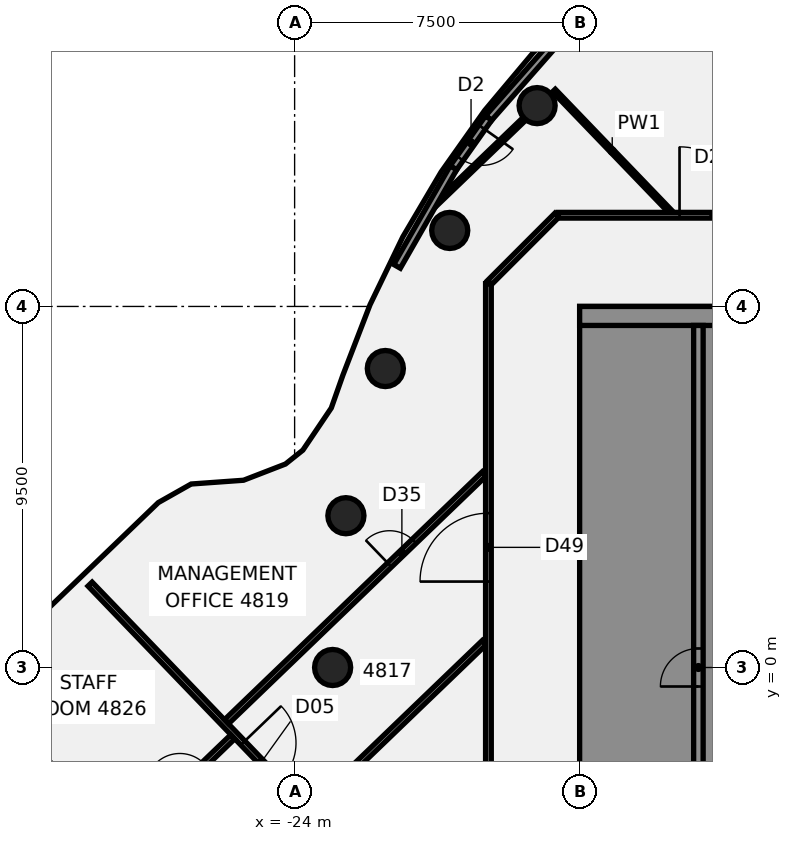
"""IFC4 building model, lengths in metres.
Left out: names, types, materials, properties, quantities, classifications, styles, units other than length and angle.
Written with IfcOpenShell. Run it as: python <this file> out.ifc"""

import sys

from ifc_helpers import new_model, si_unit, direction, frame, frame_2d, origin, origin_2d, place, context, subcontext, project, spatial, polyline, rectangle, circle, outline, extrude, element, fill, save


model = new_model("IFC4")
c1 = context("Model", 3, precision=1e-05, world=origin(), true_north=direction((0.0, 1.0)))
c2 = subcontext(c1, "Body", "Model", "MODEL_VIEW")
j1 = project(units=[si_unit("LENGTHUNIT", "METRE"), si_unit("PLANEANGLEUNIT", "RADIAN")], contexts=[c1])
p1 = place(None, origin())
s1 = spatial("IfcSite", under=j1, at=p1, CompositionType="ELEMENT")
p2 = place(p1, origin())
s2 = spatial("IfcBuilding", under=s1, at=p2, CompositionType="ELEMENT")
p3 = place(p2, frame((0.0, 0.0, 193.3)))
s3 = spatial("IfcBuildingStorey", under=s2, at=p3, CompositionType="ELEMENT", Elevation=193.3)
for number, where, z_axis, x_axis in (
    (1, (-17.619, 14.784, -0.14), (0.0, 0.0, 1.0), (1.0, 0.0, 0.0)),
    (2, (-19.919, 11.5, -0.14), (0.0, 0.0, 1.0), (1.0, 0.0, 0.0)),
    (3, (-21.613, 7.866, -0.14), (0.0, 0.0, 1.0), (1.0, 0.0, 0.0)),
    (4, (-22.651, 3.994, -0.14), (0.0, 0.0, 1.0), (1.0, 0.0, 0.0)),
    (5, (-23.0, 0.0, -0.14), (0.0, 0.0, 1.0), (1.0, 0.0, 0.0)),
):
    element("IfcColumn", number, at=place(p3, frame(where, z_axis=z_axis, x_axis=x_axis)), inside=s3, PredefinedType="COLUMN", context=c2, shape_type="SweptSolid", body=[
        extrude(circle(Radius=0.475, at=origin_2d()), origin(), (0.0, 0.0, 1.0), 3.6),
    ])
p4 = place(p3, frame((-29.383, 2.194, 0.0), z_axis=(0.0, 0.0, 1.0), x_axis=(0.693158469728, -0.720785221716, 0.0)))
e6 = element("IfcWall", 6, at=p4, inside=s3, PredefinedType="PARTITIONING", context=c2, shape_type="SweptSolid", body=[
    extrude(rectangle(XDim=14.219, YDim=0.15, at=frame_2d((7.109, 0.0))), origin(), (0.0, 0.0, 1.0), 2.864),
])
p5 = place(p4, frame((5.799, 0.0, 0.0)))
e7 = element("IfcOpeningElement", 7, at=p5, cuts=e6, PredefinedType="OPENING", context=c2, shape_type="SweptSolid", body=[
    extrude(rectangle(XDim=1.4, YDim=2.1, at=frame_2d((0.7, 1.05))), frame((0.0, 0.085, 0.0), z_axis=(0.0, -1.0, 0.0), x_axis=(1.0, 0.0, 0.0)), (0.0, 0.0, 1.0), 0.17),
])
p6 = place(p3, frame((-17.177, 15.182, 0.0), z_axis=(0.0, 0.0, 1.0), x_axis=(0.693132955765, -0.720809756894, 0.0)))
e8 = element("IfcWall", 8, at=p6, inside=s3, PredefinedType="PARTITIONING", context=c2, shape_type="SweptSolid", body=[
    extrude(rectangle(XDim=4.428, YDim=0.1, at=frame_2d((2.214, 0.0))), origin(), (0.0, 0.0, 1.0), 2.864),
])
p7 = place(p3, frame((-17.065, 11.9, 0.0), z_axis=(0.0, 0.0, 1.0), x_axis=(1.0, 0.0, 0.0)))
e9 = element("IfcWall", 9, at=p7, inside=s3, PredefinedType="PARTITIONING", context=c2, shape_type="SweptSolid", body=[
    extrude(rectangle(XDim=34.165, YDim=0.15, at=frame_2d((17.083, 0.0))), origin(), (0.0, 0.0, 1.0), 2.864),
])
p8 = place(p7, frame((24.071, 0.0, 0.0)))
e10 = element("IfcOpeningElement", 10, at=p8, cuts=e9, PredefinedType="OPENING", context=c2, shape_type="SweptSolid", body=[
    extrude(rectangle(XDim=1.8, YDim=2.1, at=frame_2d((0.9, 1.05))), frame((0.0, 0.085, 0.0), z_axis=(0.0, -1.0, 0.0), x_axis=(1.0, 0.0, 0.0)), (0.0, 0.0, 1.0), 0.17),
])
p9 = place(p7, frame((8.744, 0.0, 0.0)))
e11 = element("IfcOpeningElement", 11, at=p9, cuts=e9, PredefinedType="OPENING", context=c2, shape_type="SweptSolid", body=[
    extrude(rectangle(XDim=1.8, YDim=2.1, at=frame_2d((0.9, 1.05))), frame((0.0, 0.085, 0.0), z_axis=(0.0, -1.0, 0.0), x_axis=(1.0, 0.0, 0.0)), (0.0, 0.0, 1.0), 0.17),
])
p10 = place(p7, frame((3.194, 0.0, 0.0)))
e12 = element("IfcOpeningElement", 12, at=p10, cuts=e9, PredefinedType="OPENING", context=c2, shape_type="SweptSolid", body=[
    extrude(rectangle(XDim=1.8, YDim=2.1, at=frame_2d((0.9, 1.05))), frame((0.0, 0.085, 0.0), z_axis=(0.0, -1.0, 0.0), x_axis=(1.0, 0.0, 0.0)), (0.0, 0.0, 1.0), 0.17),
])
p11 = place(p3, frame((-28.425, -4.514, 0.0), z_axis=(0.0, 0.0, 1.0), x_axis=(0.720783488791, 0.693160271717, 0.0)))
e13 = element("IfcWall", 13, at=p11, inside=s3, PredefinedType="PARTITIONING", context=c2, shape_type="SweptSolid", body=[
    extrude(rectangle(XDim=3.88, YDim=0.15, at=frame_2d((1.94, 0.0))), origin(), (0.0, 0.0, 1.0), 2.864),
])
p12 = place(p11, frame((1.95, 0.0, 0.0)))
e14 = element("IfcOpeningElement", 14, at=p12, cuts=e13, PredefinedType="OPENING", context=c2, shape_type="SweptSolid", body=[
    extrude(rectangle(XDim=0.9, YDim=2.1, at=frame_2d((0.45, 1.05))), frame((0.0, 0.085, 0.0), z_axis=(0.0, -1.0, 0.0), x_axis=(1.0, 0.0, 0.0)), (0.0, 0.0, 1.0), 0.17),
])
p13 = place(p3, frame((-25.79, -1.426, 0.0), z_axis=(0.0, 0.0, 1.0), x_axis=(0.720775227716, 0.693168861903, 0.0)))
e15 = element("IfcWall", 15, at=p13, inside=s3, PredefinedType="PARTITIONING", context=c2, shape_type="SweptSolid", body=[
    extrude(rectangle(XDim=9.41, YDim=0.15, at=frame_2d((4.705, 0.0))), origin(), (0.0, 0.0, 1.0), 2.864),
])
p14 = place(p13, frame((5.95, 0.0, 0.0)))
e16 = element("IfcOpeningElement", 16, at=p14, cuts=e15, PredefinedType="OPENING", context=c2, shape_type="SweptSolid", body=[
    extrude(rectangle(XDim=0.9, YDim=2.1, at=frame_2d((0.45, 1.05))), frame((0.0, 0.085, 0.0), z_axis=(0.0, -1.0, 0.0), x_axis=(1.0, 0.0, 0.0)), (0.0, 0.0, 1.0), 0.17),
])
p15 = place(p3, frame((-23.572, -3.732, 0.0), z_axis=(0.0, 0.0, 1.0), x_axis=(0.720832323981, 0.693109486809, 0.0)))
e17 = element("IfcWall", 17, at=p15, inside=s3, PredefinedType="PARTITIONING", context=c2, shape_type="SweptSolid", body=[
    extrude(rectangle(XDim=6.332, YDim=0.15, at=frame_2d((3.166, 0.0))), origin(), (0.0, 0.0, 1.0), 2.864),
])
p16 = place(p3, frame((-20.306, 12.174, 0.0), z_axis=(0.0, 0.0, 1.0), x_axis=(0.720860256081, 0.693080436315, 0.0)))
e18 = element("IfcWall", 18, at=p16, inside=s3, PredefinedType="PARTITIONING", context=c2, shape_type="SweptSolid", body=[
    extrude(rectangle(XDim=3.278, YDim=0.1, at=frame_2d((1.639, 0.0))), origin(), (0.0, 0.0, 1.0), 2.864),
])
p17 = place(p3, frame((-18.872, 10.128, 0.0), z_axis=(0.0, 0.0, 1.0), x_axis=(0.707106781187, 0.707106781187, 0.0)))
e19 = element("IfcWall", 19, at=p17, inside=s3, PredefinedType="PARTITIONING", context=c2, shape_type="SweptSolid", body=[
    extrude(rectangle(XDim=2.505, YDim=0.15, at=frame_2d((1.253, 0.0))), origin(), (0.0, 0.0, 1.0), 2.864),
])
p18 = place(p3, frame((-18.9, -10.1, 0.0), z_axis=(0.0, 0.0, 1.0), x_axis=(0.0, 1.0, 0.0)))
e20 = element("IfcWall", 20, at=p18, inside=s3, PredefinedType="PARTITIONING", context=c2, shape_type="SweptSolid", body=[
    extrude(rectangle(XDim=20.2, YDim=0.15, at=frame_2d((10.1, 0.0))), origin(), (0.0, 0.0, 1.0), 2.864),
])
p19 = place(p18, frame((12.361, 0.0, 0.0)))
e21 = element("IfcOpeningElement", 21, at=p19, cuts=e20, PredefinedType="OPENING", context=c2, shape_type="SweptSolid", body=[
    extrude(rectangle(XDim=1.8, YDim=2.1, at=frame_2d((0.9, 1.05))), frame((0.0, 0.085, 0.0), z_axis=(0.0, -1.0, 0.0), x_axis=(1.0, 0.0, 0.0)), (0.0, 0.0, 1.0), 0.17),
])
p20 = place(p18, frame((5.087, 0.0, 0.0)))
e22 = element("IfcOpeningElement", 22, at=p20, cuts=e20, PredefinedType="OPENING", context=c2, shape_type="SweptSolid", body=[
    extrude(rectangle(XDim=0.9, YDim=2.1, at=frame_2d((0.45, 1.05))), frame((0.0, 0.085, 0.0), z_axis=(0.0, -1.0, 0.0), x_axis=(1.0, 0.0, 0.0)), (0.0, 0.0, 1.0), 0.17),
])
p21 = place(p3, frame((-16.919, 16.704, 0.0), z_axis=(0.0, 0.0, 1.0), x_axis=(-0.660541435627, -0.750789592243, 0.0)))
e23 = element("IfcWall", 23, at=p21, inside=s3, PredefinedType="SOLIDWALL", context=c2, shape_type="SweptSolid", body=[
    extrude(rectangle(XDim=2.992, YDim=0.2, at=frame_2d((1.496, 0.0))), origin(), (0.0, 0.0, 1.0), 3.46),
])
p22 = place(p3, frame((-19.82, 13.151, 0.0), z_axis=(0.0, 0.0, 1.0), x_axis=(-0.496622268508, -0.867966774953, 0.0)))
e24 = element("IfcWall", 24, at=p22, inside=s3, PredefinedType="SOLIDWALL", context=c2, shape_type="SweptSolid", body=[
    extrude(rectangle(XDim=2.991, YDim=0.2, at=frame_2d((1.496, 0.0))), origin(), (0.0, 0.0, 1.0), 3.46),
])
p23 = place(p3, frame((-18.896, 14.458, 0.0), z_axis=(0.0, 0.0, 1.0), x_axis=(-0.57755153974, -0.816354223939, 0.0)))
e25 = element("IfcWall", 25, at=p23, inside=s3, PredefinedType="SOLIDWALL", context=c2, shape_type="SweptSolid", body=[
    extrude(rectangle(XDim=1.6, YDim=0.2, at=frame_2d((0.8, 0.0))), origin(), (0.0, 0.0, 1.0), 3.46),
])
p24 = place(p23, frame((0.3, 0.0, 0.0)))
e26 = element("IfcOpeningElement", 26, at=p24, cuts=e25, PredefinedType="OPENING", context=c2, shape_type="SweptSolid", body=[
    extrude(rectangle(XDim=1.0, YDim=2.4, at=frame_2d((0.5, 1.2))), frame((0.0, 0.11, 0.0), z_axis=(0.0, -1.0, 0.0), x_axis=(1.0, 0.0, 0.0)), (0.0, 0.0, 1.0), 0.22),
])
p25 = place(p3, origin())
e27 = element("IfcWall", 27, at=p25, inside=s3, PredefinedType="SHEAR", context=c2, shape_type="SweptSolid", body=[
    extrude(outline(polyline([(-13.5, -8.125), (-16.0, -8.125), (-16.0, -5.625), (-13.5, -5.625), (-13.5, -5.375), (-16.0, -5.375), (-16.0, 5.375), (-13.5, 5.375), (-13.5, 5.625), (-16.0, 5.625), (-16.0, 8.125), (-13.5, 8.125), (-13.5, 9.0), (-16.0, 9.0), (-16.5, 9.0), (-16.5, -9.0), (-16.0, -9.0), (-13.5, -9.0), (-13.5, -8.125)])), origin(), (0.0, 0.0, 1.0), 3.46),
])
p26 = place(p3, frame((-16.5, 9.25, 0.0), z_axis=(0.0, 0.0, 1.0), x_axis=(1.0, 0.0, 0.0)))
e28 = element("IfcWall", 28, at=p26, inside=s3, PredefinedType="SHEAR", context=c2, shape_type="SweptSolid", body=[
    extrude(rectangle(XDim=13.0, YDim=0.5, at=frame_2d((6.5, 0.0))), origin(), (0.0, 0.0, 1.0), 3.46),
])
p27 = place(p3, frame((-13.375, -9.0, 0.0), z_axis=(0.0, 0.0, 1.0), x_axis=(0.0, 1.0, 0.0)))
e29 = element("IfcWall", 29, at=p27, inside=s3, PredefinedType="SHEAR", context=c2, shape_type="SweptSolid", body=[
    extrude(rectangle(XDim=18.0, YDim=0.25, at=frame_2d((9.0, 0.0))), origin(), (0.0, 0.0, 1.0), 3.46),
])
p28 = place(p27, frame((1.425, 0.0, 0.0)))
e30 = element("IfcOpeningElement", 30, at=p28, cuts=e29, PredefinedType="OPENING", context=c2, shape_type="SweptSolid", body=[
    extrude(rectangle(XDim=1.4, YDim=2.1, at=frame_2d((0.7, 1.05))), frame((0.0, 0.135, 0.0), z_axis=(0.0, -1.0, 0.0), x_axis=(1.0, 0.0, 0.0)), (0.0, 0.0, 1.0), 0.27),
])
p29 = place(p27, frame((8.5, 0.0, 0.0)))
e31 = element("IfcOpeningElement", 31, at=p29, cuts=e29, PredefinedType="OPENING", context=c2, shape_type="SweptSolid", body=[
    extrude(rectangle(XDim=1.0, YDim=2.1, at=frame_2d((0.5, 1.05))), frame((0.0, 0.135, 0.0), z_axis=(0.0, -1.0, 0.0), x_axis=(1.0, 0.0, 0.0)), (0.0, 0.0, 1.0), 0.27),
])
p30 = place(p3, frame((-30.883, -2.16, -0.14), z_axis=(0.0, 0.0, 1.0), x_axis=(0.693163600241, -0.720780287814, 0.0)))
e32 = element("IfcWall", 32, at=p30, inside=s3, PredefinedType="SHEAR", context=c2, shape_type="SweptSolid", body=[
    extrude(rectangle(XDim=3.2, YDim=0.2, at=frame_2d((1.6, 0.0))), origin(), (0.0, 0.0, 1.0), 3.004),
])
p31 = place(p5, origin())
e33 = element("IfcDoor", 33, at=p31, inside=s3, OperationType="DOUBLE_DOOR_SINGLE_SWING", PredefinedType="DOOR", context=c2, shape_type="SweptSolid", body=[
    extrude(rectangle(XDim=1.4, YDim=2.1, at=frame_2d((0.7, 1.05))), frame((0.0, 0.025, 0.0), z_axis=(0.0, -1.0, 0.0), x_axis=(1.0, 0.0, 0.0)), (0.0, 0.0, 1.0), 0.05),
])
fill(e7, e33)
p32 = place(p10, origin())
e34 = element("IfcDoor", 34, at=p32, inside=s3, OperationType="DOUBLE_DOOR_SINGLE_SWING", PredefinedType="DOOR", context=c2, shape_type="SweptSolid", body=[
    extrude(rectangle(XDim=1.8, YDim=2.1, at=frame_2d((0.9, 1.05))), frame((0.0, 0.025, 0.0), z_axis=(0.0, -1.0, 0.0), x_axis=(1.0, 0.0, 0.0)), (0.0, 0.0, 1.0), 0.05),
])
fill(e12, e34)
p33 = place(p14, origin())
e35 = element("IfcDoor", 35, at=p33, inside=s3, OperationType="SINGLE_SWING_LEFT", PredefinedType="DOOR", context=c2, shape_type="SweptSolid", body=[
    extrude(rectangle(XDim=0.9, YDim=2.1, at=frame_2d((0.45, 1.05))), frame((0.0, 0.025, 0.0), z_axis=(0.0, -1.0, 0.0), x_axis=(1.0, 0.0, 0.0)), (0.0, 0.0, 1.0), 0.05),
])
fill(e16, e35)
p34 = place(p19, frame((1.8, 0.0, 0.0), z_axis=(0.0, 0.0, 1.0), x_axis=(-1.0, 0.0, 0.0)))
e36 = element("IfcDoor", 36, at=p34, inside=s3, OperationType="DOUBLE_DOOR_SINGLE_SWING", PredefinedType="DOOR", context=c2, shape_type="SweptSolid", body=[
    extrude(rectangle(XDim=1.8, YDim=2.1, at=frame_2d((0.9, 1.05))), frame((0.0, 0.025, 0.0), z_axis=(0.0, -1.0, 0.0), x_axis=(1.0, 0.0, 0.0)), (0.0, 0.0, 1.0), 0.05),
])
fill(e21, e36)
p35 = place(p24, origin())
e37 = element("IfcDoor", 37, at=p35, inside=s3, OperationType="SINGLE_SWING_LEFT", PredefinedType="DOOR", context=c2, shape_type="SweptSolid", body=[
    extrude(rectangle(XDim=1.0, YDim=2.4, at=frame_2d((0.5, 1.2))), frame((0.0, 0.025, 0.0), z_axis=(0.0, -1.0, 0.0), x_axis=(1.0, 0.0, 0.0)), (0.0, 0.0, 1.0), 0.05),
])
fill(e26, e37)
p36 = place(p29, origin())
e38 = element("IfcDoor", 38, at=p36, inside=s3, OperationType="SINGLE_SWING_LEFT", PredefinedType="DOOR", context=c2, shape_type="SweptSolid", body=[
    extrude(rectangle(XDim=1.0, YDim=2.1, at=frame_2d((0.5, 1.05))), frame((0.0, 0.025, 0.0), z_axis=(0.0, -1.0, 0.0), x_axis=(1.0, 0.0, 0.0)), (0.0, 0.0, 1.0), 0.05),
])
fill(e31, e38)
save(model, sys.argv[1])
